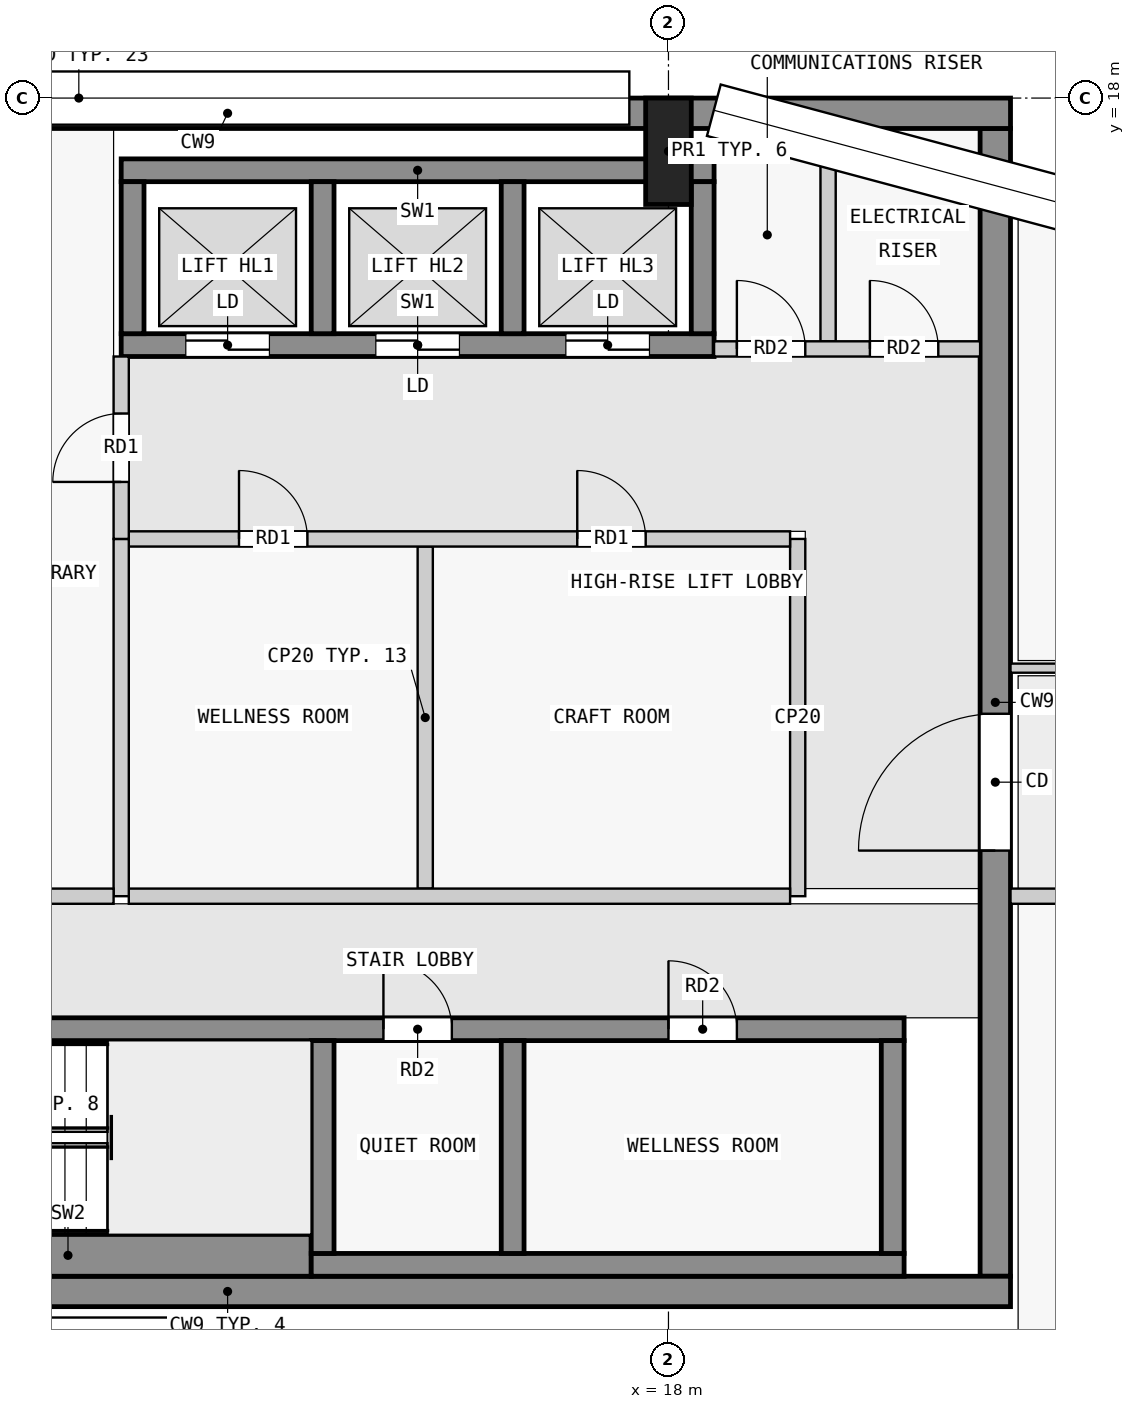
"""IFC4 building model, lengths in metres.
Left out: names, types, materials, properties, quantities, classifications, styles, units other than length and angle.
Written with IfcOpenShell. Run it as: python <this file> out.ifc"""

import sys

from ifc_helpers import new_model, si_unit, direction, frame, frame_2d, origin, origin_2d, place, context, subcontext, project, spatial, rectangle, extrude, element, fill, save


model = new_model("IFC4")
c1 = context("Model", 3, precision=1e-05, world=origin(), true_north=direction((0.0, 1.0)))
c2 = subcontext(c1, "Body", "Model", "MODEL_VIEW")
j1 = project(units=[si_unit("LENGTHUNIT", "METRE"), si_unit("PLANEANGLEUNIT", "RADIAN")], contexts=[c1])
p1 = place(None, origin())
s1 = spatial("IfcSite", under=j1, at=p1, CompositionType="ELEMENT")
p2 = place(p1, origin())
s2 = spatial("IfcBuilding", under=s1, at=p2, CompositionType="ELEMENT")
p3 = place(p2, frame((0.0, 0.0, 294.9)))
s3 = spatial("IfcBuildingStorey", under=s2, at=p3, CompositionType="ELEMENT", Elevation=294.9)
p4 = place(p3, frame((18.0, 17.3, 0.0), z_axis=(0.0, 0.0, 1.0), x_axis=(1.0, 0.0, 0.0)))
e1 = element("IfcColumn", 1, at=p4, inside=s3, PredefinedType="COLUMN", context=c2, shape_type="SweptSolid", body=[
    extrude(rectangle(XDim=0.6, YDim=1.4, at=origin_2d()), origin(), (0.0, 0.0, 1.0), 3.5),
])
for number, where, z_axis, x_axis in (
    (2, (1.9, 2.3, 0.0), (0.0, 0.0, 1.0), (1.0, 0.0, 0.0)),
    (3, (1.9, 17.8, 0.0), (0.0, 0.0, 1.0), (1.0, 0.0, 0.0)),
):
    element("IfcWall", number, at=place(p3, frame(where, z_axis=z_axis, x_axis=x_axis)), inside=s3, PredefinedType="SHEAR", context=c2, shape_type="SweptSolid", body=[
        extrude(rectangle(XDim=20.6, YDim=0.4, at=frame_2d((10.3, 0.0))), origin(), (0.0, 0.0, 1.0), 3.25),
    ])
p5 = place(p3, frame((22.3, 2.5, 0.0), z_axis=(0.0, 0.0, 1.0), x_axis=(0.0, 1.0, 0.0)))
e4 = element("IfcWall", 4, at=p5, inside=s3, PredefinedType="SHEAR", context=c2, shape_type="SweptSolid", body=[
    extrude(rectangle(XDim=15.1, YDim=0.4, at=frame_2d((7.55, 0.0))), origin(), (0.0, 0.0, 1.0), 3.25),
])
p6 = place(p5, frame((5.6, 0.0, 0.0)))
e5 = element("IfcOpeningElement", 5, at=p6, cuts=e4, PredefinedType="OPENING", context=c2, shape_type="SweptSolid", body=[
    extrude(rectangle(XDim=1.8, YDim=2.1, at=frame_2d((0.9, 1.05))), frame((0.0, 0.21, 0.0), z_axis=(0.0, -1.0, 0.0), x_axis=(1.0, 0.0, 0.0)), (0.0, 0.0, 1.0), 0.42),
])
p7 = place(p3, frame((6.9, 2.775, 0.0), z_axis=(0.0, 0.0, 1.0), x_axis=(1.0, 0.0, 0.0)))
e6 = element("IfcWall", 6, at=p7, inside=s3, PredefinedType="SHEAR", context=c2, shape_type="SweptSolid", body=[
    extrude(rectangle(XDim=6.4, YDim=0.55, at=frame_2d((3.2, 0.0))), origin(), (0.0, 0.0, 1.0), 3.25),
])
p8 = place(p3, frame((13.3, 2.65, 0.0), z_axis=(0.0, 0.0, 1.0), x_axis=(1.0, 0.0, 0.0)))
e7 = element("IfcWall", 7, at=p8, inside=s3, PredefinedType="SHEAR", context=c2, shape_type="SweptSolid", body=[
    extrude(rectangle(XDim=7.8, YDim=0.3, at=frame_2d((3.9, 0.0))), origin(), (0.0, 0.0, 1.0), 3.25),
])
for number, where, z_axis, x_axis in (
    (8, (13.45, 2.8, 0.0), (0.0, 0.0, 1.0), (0.0, 1.0, 0.0)),
    (9, (15.95, 2.8, 0.0), (0.0, 0.0, 1.0), (0.0, 1.0, 0.0)),
    (10, (20.95, 2.8, 0.0), (0.0, 0.0, 1.0), (0.0, 1.0, 0.0)),
):
    element("IfcWall", number, at=place(p3, frame(where, z_axis=z_axis, x_axis=x_axis)), inside=s3, PredefinedType="SHEAR", context=c2, shape_type="SweptSolid", body=[
        extrude(rectangle(XDim=2.8, YDim=0.3, at=frame_2d((1.4, 0.0))), origin(), (0.0, 0.0, 1.0), 3.25),
    ])
p9 = place(p3, frame((2.3, 5.75, 0.0), z_axis=(0.0, 0.0, 1.0), x_axis=(1.0, 0.0, 0.0)))
e11 = element("IfcWall", 11, at=p9, inside=s3, PredefinedType="SHEAR", context=c2, shape_type="SweptSolid", body=[
    extrude(rectangle(XDim=18.8, YDim=0.3, at=frame_2d((9.4, 0.0))), origin(), (0.0, 0.0, 1.0), 3.25),
])
p10 = place(p9, frame((4.65, 0.0, 0.0)))
e12 = element("IfcOpeningElement", 12, at=p10, cuts=e11, PredefinedType="OPENING", context=c2, shape_type="SweptSolid", body=[
    extrude(rectangle(XDim=1.1, YDim=2.1, at=frame_2d((0.55, 1.05))), frame((0.0, 0.16, 0.0), z_axis=(0.0, -1.0, 0.0), x_axis=(1.0, 0.0, 0.0)), (0.0, 0.0, 1.0), 0.32),
])
p11 = place(p9, frame((0.45, 0.0, 0.0)))
e13 = element("IfcOpeningElement", 13, at=p11, cuts=e11, PredefinedType="OPENING", context=c2, shape_type="SweptSolid", body=[
    extrude(rectangle(XDim=1.1, YDim=2.1, at=frame_2d((0.55, 1.05))), frame((0.0, 0.16, 0.0), z_axis=(0.0, -1.0, 0.0), x_axis=(1.0, 0.0, 0.0)), (0.0, 0.0, 1.0), 0.32),
])
p12 = place(p9, frame((2.75, 0.0, 0.0)))
e14 = element("IfcOpeningElement", 14, at=p12, cuts=e11, PredefinedType="OPENING", context=c2, shape_type="SweptSolid", body=[
    extrude(rectangle(XDim=1.1, YDim=2.1, at=frame_2d((0.55, 1.05))), frame((0.0, 0.16, 0.0), z_axis=(0.0, -1.0, 0.0), x_axis=(1.0, 0.0, 0.0)), (0.0, 0.0, 1.0), 0.32),
])
p13 = place(p9, frame((11.95, 0.0, 0.0)))
e15 = element("IfcOpeningElement", 15, at=p13, cuts=e11, PredefinedType="OPENING", context=c2, shape_type="SweptSolid", body=[
    extrude(rectangle(XDim=0.9, YDim=2.1, at=frame_2d((0.45, 1.05))), frame((0.0, 0.16, 0.0), z_axis=(0.0, -1.0, 0.0), x_axis=(1.0, 0.0, 0.0)), (0.0, 0.0, 1.0), 0.32),
])
p14 = place(p9, frame((15.7, 0.0, 0.0)))
e16 = element("IfcOpeningElement", 16, at=p14, cuts=e11, PredefinedType="OPENING", context=c2, shape_type="SweptSolid", body=[
    extrude(rectangle(XDim=0.9, YDim=2.1, at=frame_2d((0.45, 1.05))), frame((0.0, 0.16, 0.0), z_axis=(0.0, -1.0, 0.0), x_axis=(1.0, 0.0, 0.0)), (0.0, 0.0, 1.0), 0.32),
])
p15 = place(p3, frame((10.8, 17.05, 0.0), z_axis=(0.0, 0.0, 1.0), x_axis=(1.0, 0.0, 0.0)))
e17 = element("IfcWall", 17, at=p15, inside=s3, PredefinedType="SHEAR", context=c2, shape_type="SweptSolid", body=[
    extrude(rectangle(XDim=7.8, YDim=0.3, at=frame_2d((3.9, 0.0))), origin(), (0.0, 0.0, 1.0), 3.25),
])
p16 = place(p3, frame((10.8, 14.75, 0.0), z_axis=(0.0, 0.0, 1.0), x_axis=(1.0, 0.0, 0.0)))
e18 = element("IfcWall", 18, at=p16, inside=s3, PredefinedType="SHEAR", context=c2, shape_type="SweptSolid", body=[
    extrude(rectangle(XDim=7.8, YDim=0.3, at=frame_2d((3.9, 0.0))), origin(), (0.0, 0.0, 1.0), 3.25),
])
p17 = place(p16, frame((0.85, 0.0, 0.0)))
e19 = element("IfcOpeningElement", 19, at=p17, cuts=e18, PredefinedType="OPENING", context=c2, shape_type="SweptSolid", body=[
    extrude(rectangle(XDim=1.1, YDim=2.1, at=frame_2d((0.55, 1.05))), frame((0.0, 0.16, 0.0), z_axis=(0.0, -1.0, 0.0), x_axis=(1.0, 0.0, 0.0)), (0.0, 0.0, 1.0), 0.32),
])
p18 = place(p16, frame((3.35, 0.0, 0.0)))
e20 = element("IfcOpeningElement", 20, at=p18, cuts=e18, PredefinedType="OPENING", context=c2, shape_type="SweptSolid", body=[
    extrude(rectangle(XDim=1.1, YDim=2.1, at=frame_2d((0.55, 1.05))), frame((0.0, 0.16, 0.0), z_axis=(0.0, -1.0, 0.0), x_axis=(1.0, 0.0, 0.0)), (0.0, 0.0, 1.0), 0.32),
])
p19 = place(p16, frame((5.85, 0.0, 0.0)))
e21 = element("IfcOpeningElement", 21, at=p19, cuts=e18, PredefinedType="OPENING", context=c2, shape_type="SweptSolid", body=[
    extrude(rectangle(XDim=1.1, YDim=2.1, at=frame_2d((0.55, 1.05))), frame((0.0, 0.16, 0.0), z_axis=(0.0, -1.0, 0.0), x_axis=(1.0, 0.0, 0.0)), (0.0, 0.0, 1.0), 0.32),
])
for number, where, z_axis, x_axis in (
    (22, (10.95, 14.9, 0.0), (0.0, 0.0, 1.0), (0.0, 1.0, 0.0)),
    (23, (13.45, 14.9, 0.0), (0.0, 0.0, 1.0), (0.0, 1.0, 0.0)),
    (24, (15.95, 14.9, 0.0), (0.0, 0.0, 1.0), (0.0, 1.0, 0.0)),
    (25, (18.45, 14.9, 0.0), (0.0, 0.0, 1.0), (0.0, 1.0, 0.0)),
):
    element("IfcWall", number, at=place(p3, frame(where, z_axis=z_axis, x_axis=x_axis)), inside=s3, PredefinedType="SHEAR", context=c2, shape_type="SweptSolid", body=[
        extrude(rectangle(XDim=2.0, YDim=0.3, at=frame_2d((1.0, 0.0))), origin(), (0.0, 0.0, 1.0), 3.25),
    ])
p20 = place(p3, frame((7.1, 7.5, 0.0), z_axis=(0.0, 0.0, 1.0), x_axis=(1.0, 0.0, 0.0)))
e26 = element("IfcWall", 26, at=p20, inside=s3, PredefinedType="PARTITIONING", context=c2, shape_type="SweptSolid", body=[
    extrude(rectangle(XDim=3.6, YDim=0.2, at=frame_2d((1.8, 0.0))), origin(), (0.0, 0.0, 1.0), 3.25),
])
p21 = place(p3, frame((10.8, 12.2, 0.0), z_axis=(0.0, 0.0, 1.0), x_axis=(0.0, 1.0, 0.0)))
e27 = element("IfcWall", 27, at=p21, inside=s3, PredefinedType="PARTITIONING", context=c2, shape_type="SweptSolid", body=[
    extrude(rectangle(XDim=2.4, YDim=0.2, at=frame_2d((1.2, 0.0))), origin(), (0.0, 0.0, 1.0), 3.25),
])
p22 = place(p21, frame((0.75, 0.0, 0.0)))
e28 = element("IfcOpeningElement", 28, at=p22, cuts=e27, PredefinedType="OPENING", context=c2, shape_type="SweptSolid", body=[
    extrude(rectangle(XDim=0.9, YDim=2.1, at=frame_2d((0.45, 1.05))), frame((0.0, 0.11, 0.0), z_axis=(0.0, -1.0, 0.0), x_axis=(1.0, 0.0, 0.0)), (0.0, 0.0, 1.0), 0.22),
])
p23 = place(p3, frame((10.8, 7.5, 0.0), z_axis=(0.0, 0.0, 1.0), x_axis=(0.0, 1.0, 0.0)))
e29 = element("IfcWall", 29, at=p23, inside=s3, PredefinedType="PARTITIONING", context=c2, shape_type="SweptSolid", body=[
    extrude(rectangle(XDim=4.7, YDim=0.2, at=frame_2d((2.35, 0.0))), origin(), (0.0, 0.0, 1.0), 3.25),
])
p24 = place(p3, frame((10.9, 7.5, 0.0), z_axis=(0.0, 0.0, 1.0), x_axis=(1.0, 0.0, 0.0)))
e30 = element("IfcWall", 30, at=p24, inside=s3, PredefinedType="PARTITIONING", context=c2, shape_type="SweptSolid", body=[
    extrude(rectangle(XDim=8.7, YDim=0.2, at=frame_2d((4.35, 0.0))), origin(), (0.0, 0.0, 1.0), 3.25),
])
p25 = place(p3, frame((19.7, 7.5, 0.0), z_axis=(0.0, 0.0, 1.0), x_axis=(0.0, 1.0, 0.0)))
e31 = element("IfcWall", 31, at=p25, inside=s3, PredefinedType="PARTITIONING", context=c2, shape_type="SweptSolid", body=[
    extrude(rectangle(XDim=4.7, YDim=0.2, at=frame_2d((2.35, 0.0))), origin(), (0.0, 0.0, 1.0), 3.25),
])
p26 = place(p3, frame((10.9, 12.2, 0.0), z_axis=(0.0, 0.0, 1.0), x_axis=(1.0, 0.0, 0.0)))
e32 = element("IfcWall", 32, at=p26, inside=s3, PredefinedType="PARTITIONING", context=c2, shape_type="SweptSolid", body=[
    extrude(rectangle(XDim=8.7, YDim=0.2, at=frame_2d((4.35, 0.0))), origin(), (0.0, 0.0, 1.0), 3.25),
])
p27 = place(p26, frame((1.45, 0.0, 0.0)))
e33 = element("IfcOpeningElement", 33, at=p27, cuts=e32, PredefinedType="OPENING", context=c2, shape_type="SweptSolid", body=[
    extrude(rectangle(XDim=0.9, YDim=2.1, at=frame_2d((0.45, 1.05))), frame((0.0, 0.11, 0.0), z_axis=(0.0, -1.0, 0.0), x_axis=(1.0, 0.0, 0.0)), (0.0, 0.0, 1.0), 0.22),
])
p28 = place(p26, frame((5.9, 0.0, 0.0)))
e34 = element("IfcOpeningElement", 34, at=p28, cuts=e32, PredefinedType="OPENING", context=c2, shape_type="SweptSolid", body=[
    extrude(rectangle(XDim=0.9, YDim=2.1, at=frame_2d((0.45, 1.05))), frame((0.0, 0.11, 0.0), z_axis=(0.0, -1.0, 0.0), x_axis=(1.0, 0.0, 0.0)), (0.0, 0.0, 1.0), 0.22),
])
p29 = place(p3, frame((14.8, 7.6, 0.0), z_axis=(0.0, 0.0, 1.0), x_axis=(0.0, 1.0, 0.0)))
e35 = element("IfcWall", 35, at=p29, inside=s3, PredefinedType="PARTITIONING", context=c2, shape_type="SweptSolid", body=[
    extrude(rectangle(XDim=4.5, YDim=0.2, at=frame_2d((2.25, 0.0))), origin(), (0.0, 0.0, 1.0), 3.25),
])
p30 = place(p3, frame((18.6, 14.7, 0.0), z_axis=(0.0, 0.0, 1.0), x_axis=(1.0, 0.0, 0.0)))
e36 = element("IfcWall", 36, at=p30, inside=s3, PredefinedType="PARTITIONING", context=c2, shape_type="SweptSolid", body=[
    extrude(rectangle(XDim=3.5, YDim=0.2, at=frame_2d((1.75, 0.0))), origin(), (0.0, 0.0, 1.0), 3.25),
])
p31 = place(p30, frame((0.3, 0.0, 0.0)))
e37 = element("IfcOpeningElement", 37, at=p31, cuts=e36, PredefinedType="OPENING", context=c2, shape_type="SweptSolid", body=[
    extrude(rectangle(XDim=0.9, YDim=2.1, at=frame_2d((0.45, 1.05))), frame((0.0, 0.11, 0.0), z_axis=(0.0, -1.0, 0.0), x_axis=(1.0, 0.0, 0.0)), (0.0, 0.0, 1.0), 0.22),
])
p32 = place(p30, frame((2.05, 0.0, 0.0)))
e38 = element("IfcOpeningElement", 38, at=p32, cuts=e36, PredefinedType="OPENING", context=c2, shape_type="SweptSolid", body=[
    extrude(rectangle(XDim=0.9, YDim=2.1, at=frame_2d((0.45, 1.05))), frame((0.0, 0.11, 0.0), z_axis=(0.0, -1.0, 0.0), x_axis=(1.0, 0.0, 0.0)), (0.0, 0.0, 1.0), 0.22),
])
p33 = place(p3, frame((20.1, 14.8, 0.0), z_axis=(0.0, 0.0, 1.0), x_axis=(0.0, 1.0, 0.0)))
e39 = element("IfcWall", 39, at=p33, inside=s3, PredefinedType="PARTITIONING", context=c2, shape_type="SweptSolid", body=[
    extrude(rectangle(XDim=2.8, YDim=0.2, at=frame_2d((1.4, 0.0))), origin(), (0.0, 0.0, 1.0), 3.25),
])
p34 = place(p3, frame((22.5, 10.5, 0.0), z_axis=(0.0, 0.0, 1.0), x_axis=(1.0, 0.0, 0.0)))
e40 = element("IfcWall", 40, at=p34, inside=s3, PredefinedType="PARTITIONING", context=c2, shape_type="SweptSolid", body=[
    extrude(rectangle(XDim=4.5, YDim=0.12, at=frame_2d((2.25, 0.0))), origin(), (0.0, 0.0, 1.0), 3.25),
])
p35 = place(p3, frame((27.0, 7.5, 0.0), z_axis=(0.0, 0.0, 1.0), x_axis=(-1.0, 0.0, 0.0)))
e41 = element("IfcWall", 41, at=p35, inside=s3, PredefinedType="PARTITIONING", context=c2, shape_type="SweptSolid", body=[
    extrude(rectangle(XDim=4.5, YDim=0.2, at=frame_2d((2.25, 0.0))), origin(), (0.0, 0.0, 1.0), 3.25),
])
p36 = place(p22, origin())
e42 = element("IfcDoor", 42, at=p36, inside=s3, OperationType="SINGLE_SWING_LEFT", PredefinedType="DOOR", context=c2, shape_type="SweptSolid", body=[
    extrude(rectangle(XDim=0.9, YDim=2.1, at=frame_2d((0.45, 1.05))), frame((0.0, 0.025, 0.0), z_axis=(0.0, -1.0, 0.0), x_axis=(1.0, 0.0, 0.0)), (0.0, 0.0, 1.0), 0.05),
])
fill(e28, e42)
p37 = place(p27, origin())
e43 = element("IfcDoor", 43, at=p37, inside=s3, OperationType="SINGLE_SWING_LEFT", PredefinedType="DOOR", context=c2, shape_type="SweptSolid", body=[
    extrude(rectangle(XDim=0.9, YDim=2.1, at=frame_2d((0.45, 1.05))), frame((0.0, 0.025, 0.0), z_axis=(0.0, -1.0, 0.0), x_axis=(1.0, 0.0, 0.0)), (0.0, 0.0, 1.0), 0.05),
])
fill(e33, e43)
p38 = place(p28, origin())
e44 = element("IfcDoor", 44, at=p38, inside=s3, OperationType="SINGLE_SWING_LEFT", PredefinedType="DOOR", context=c2, shape_type="SweptSolid", body=[
    extrude(rectangle(XDim=0.9, YDim=2.1, at=frame_2d((0.45, 1.05))), frame((0.0, 0.025, 0.0), z_axis=(0.0, -1.0, 0.0), x_axis=(1.0, 0.0, 0.0)), (0.0, 0.0, 1.0), 0.05),
])
fill(e34, e44)
p39 = place(p17, origin())
e45 = element("IfcDoor", 45, at=p39, inside=s3, OperationType="DOUBLE_DOOR_SLIDING", PredefinedType="DOOR", context=c2, shape_type="SweptSolid", body=[
    extrude(rectangle(XDim=1.1, YDim=2.1, at=frame_2d((0.55, 1.05))), frame((0.0, 0.025, 0.0), z_axis=(0.0, -1.0, 0.0), x_axis=(1.0, 0.0, 0.0)), (0.0, 0.0, 1.0), 0.05),
])
fill(e19, e45)
p40 = place(p18, origin())
e46 = element("IfcDoor", 46, at=p40, inside=s3, OperationType="DOUBLE_DOOR_SLIDING", PredefinedType="DOOR", context=c2, shape_type="SweptSolid", body=[
    extrude(rectangle(XDim=1.1, YDim=2.1, at=frame_2d((0.55, 1.05))), frame((0.0, 0.025, 0.0), z_axis=(0.0, -1.0, 0.0), x_axis=(1.0, 0.0, 0.0)), (0.0, 0.0, 1.0), 0.05),
])
fill(e20, e46)
p41 = place(p19, origin())
e47 = element("IfcDoor", 47, at=p41, inside=s3, OperationType="DOUBLE_DOOR_SLIDING", PredefinedType="DOOR", context=c2, shape_type="SweptSolid", body=[
    extrude(rectangle(XDim=1.1, YDim=2.1, at=frame_2d((0.55, 1.05))), frame((0.0, 0.025, 0.0), z_axis=(0.0, -1.0, 0.0), x_axis=(1.0, 0.0, 0.0)), (0.0, 0.0, 1.0), 0.05),
])
fill(e21, e47)
p42 = place(p6, origin())
e48 = element("IfcDoor", 48, at=p42, inside=s3, OperationType="DOUBLE_DOOR_SINGLE_SWING", PredefinedType="DOOR", context=c2, shape_type="SweptSolid", body=[
    extrude(rectangle(XDim=1.8, YDim=2.1, at=frame_2d((0.9, 1.05))), frame((0.0, 0.025, 0.0), z_axis=(0.0, -1.0, 0.0), x_axis=(1.0, 0.0, 0.0)), (0.0, 0.0, 1.0), 0.05),
])
fill(e5, e48)
p43 = place(p31, origin())
e49 = element("IfcDoor", 49, at=p43, inside=s3, OperationType="SINGLE_SWING_LEFT", PredefinedType="DOOR", context=c2, shape_type="SweptSolid", body=[
    extrude(rectangle(XDim=0.9, YDim=2.1, at=frame_2d((0.45, 1.05))), frame((0.0, 0.025, 0.0), z_axis=(0.0, -1.0, 0.0), x_axis=(1.0, 0.0, 0.0)), (0.0, 0.0, 1.0), 0.05),
])
fill(e37, e49)
p44 = place(p32, origin())
e50 = element("IfcDoor", 50, at=p44, inside=s3, OperationType="SINGLE_SWING_LEFT", PredefinedType="DOOR", context=c2, shape_type="SweptSolid", body=[
    extrude(rectangle(XDim=0.9, YDim=2.1, at=frame_2d((0.45, 1.05))), frame((0.0, 0.025, 0.0), z_axis=(0.0, -1.0, 0.0), x_axis=(1.0, 0.0, 0.0)), (0.0, 0.0, 1.0), 0.05),
])
fill(e38, e50)
p45 = place(p13, origin())
e51 = element("IfcDoor", 51, at=p45, inside=s3, OperationType="SINGLE_SWING_LEFT", PredefinedType="DOOR", context=c2, shape_type="SweptSolid", body=[
    extrude(rectangle(XDim=0.9, YDim=2.1, at=frame_2d((0.45, 1.05))), frame((0.0, 0.025, 0.0), z_axis=(0.0, -1.0, 0.0), x_axis=(1.0, 0.0, 0.0)), (0.0, 0.0, 1.0), 0.05),
])
fill(e15, e51)
p46 = place(p14, origin())
e52 = element("IfcDoor", 52, at=p46, inside=s3, OperationType="SINGLE_SWING_LEFT", PredefinedType="DOOR", context=c2, shape_type="SweptSolid", body=[
    extrude(rectangle(XDim=0.9, YDim=2.1, at=frame_2d((0.45, 1.05))), frame((0.0, 0.025, 0.0), z_axis=(0.0, -1.0, 0.0), x_axis=(1.0, 0.0, 0.0)), (0.0, 0.0, 1.0), 0.05),
])
fill(e16, e52)
save(model, sys.argv[1])
